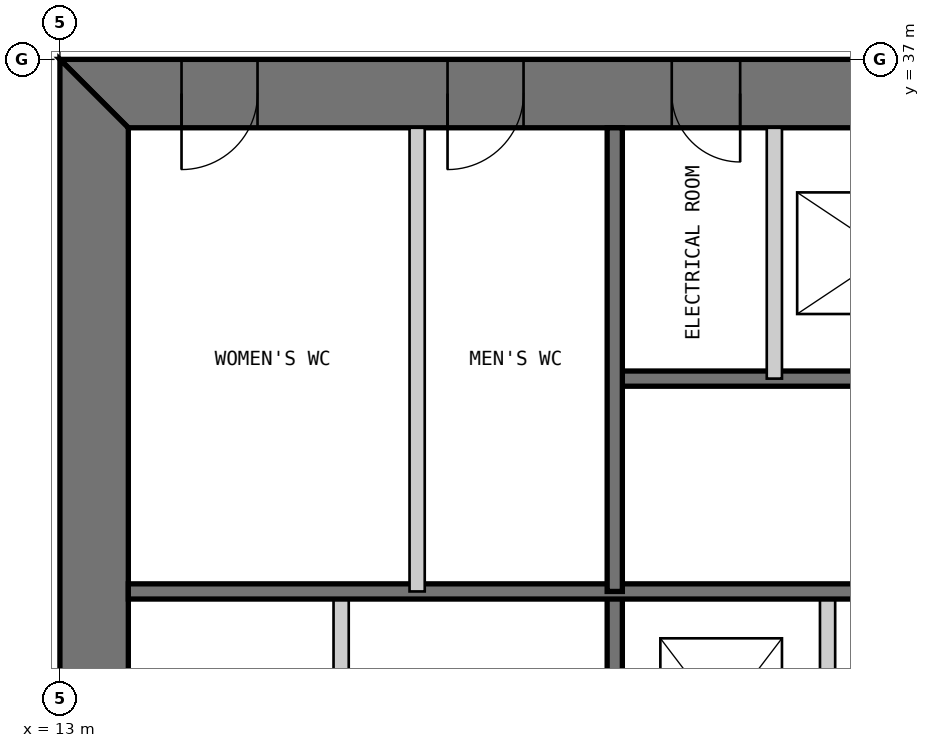
"""IFC4 building model, lengths in metres.
Left out: names, types, materials, properties, quantities, classifications, styles, units other than length and angle.
Written with IfcOpenShell. Run it as: python <this file> out.ifc"""

import sys

from ifc_helpers import new_model, si_unit, direction, frame, frame_2d, origin, place, context, subcontext, project, spatial, polyline, rectangle, outline, extrude, element, fill, save


model = new_model("IFC4")
c1 = context("Model", 3, precision=1e-05, world=origin(), true_north=direction((0.0, 1.0)))
c2 = subcontext(c1, "Body", "Model", "MODEL_VIEW")
j1 = project(units=[si_unit("LENGTHUNIT", "METRE"), si_unit("PLANEANGLEUNIT", "RADIAN")], contexts=[c1])
p1 = place(None, origin())
s1 = spatial("IfcSite", under=j1, at=p1, CompositionType="ELEMENT")
p2 = place(p1, origin())
s2 = spatial("IfcBuilding", under=s1, at=p2, CompositionType="ELEMENT")
p3 = place(p2, frame((0.0, 0.0, 110.4)))
s3 = spatial("IfcBuildingStorey", under=s2, at=p3, CompositionType="ELEMENT", Elevation=110.4)
p4 = place(p3, frame((37.0, 36.55, 0.0), z_axis=(0.0, 0.0, 1.0), x_axis=(-1.0, 0.0, 0.0)))
e1 = element("IfcWall", 1, at=p4, inside=s3, PredefinedType="SHEAR", context=c2, shape_type="SweptSolid", body=[
    extrude(outline(polyline([(0.0, -0.45), (24.0, -0.45), (23.1, 0.45), (0.9, 0.45), (0.0, -0.45)])), origin(), (0.0, 0.0, 1.0), 4.0),
])
p5 = place(p4, frame((4.9, 0.0, 0.0)))
e2 = element("IfcOpeningElement", 2, at=p5, cuts=e1, PredefinedType="OPENING", context=c2, shape_type="SweptSolid", body=[
    extrude(rectangle(XDim=1.0, YDim=2.2, at=frame_2d((0.5, 1.1))), frame((0.0, 0.46, 0.0), z_axis=(0.0, -1.0, 0.0), x_axis=(1.0, 0.0, 0.0)), (0.0, 0.0, 1.0), 0.92),
])
p6 = place(p4, frame((8.9, 0.0, 0.0)))
e3 = element("IfcOpeningElement", 3, at=p6, cuts=e1, PredefinedType="OPENING", context=c2, shape_type="SweptSolid", body=[
    extrude(rectangle(XDim=1.1, YDim=2.2, at=frame_2d((0.55, 1.1))), frame((0.0, 0.46, 0.0), z_axis=(0.0, -1.0, 0.0), x_axis=(1.0, 0.0, 0.0)), (0.0, 0.0, 1.0), 0.92),
])
p7 = place(p4, frame((15.05, 0.0, 0.0)))
e4 = element("IfcOpeningElement", 4, at=p7, cuts=e1, PredefinedType="OPENING", context=c2, shape_type="SweptSolid", body=[
    extrude(rectangle(XDim=0.9, YDim=2.2, at=frame_2d((0.45, 1.1))), frame((0.0, 0.46, 0.0), z_axis=(0.0, -1.0, 0.0), x_axis=(1.0, 0.0, 0.0)), (0.0, 0.0, 1.0), 0.92),
])
p8 = place(p4, frame((17.9, 0.0, 0.0)))
e5 = element("IfcOpeningElement", 5, at=p8, cuts=e1, PredefinedType="OPENING", context=c2, shape_type="SweptSolid", body=[
    extrude(rectangle(XDim=1.0, YDim=2.2, at=frame_2d((0.5, 1.1))), frame((0.0, 0.46, 0.0), z_axis=(0.0, -1.0, 0.0), x_axis=(1.0, 0.0, 0.0)), (0.0, 0.0, 1.0), 0.92),
])
p9 = place(p4, frame((21.4, 0.0, 0.0)))
e6 = element("IfcOpeningElement", 6, at=p9, cuts=e1, PredefinedType="OPENING", context=c2, shape_type="SweptSolid", body=[
    extrude(rectangle(XDim=1.0, YDim=2.2, at=frame_2d((0.5, 1.1))), frame((0.0, 0.46, 0.0), z_axis=(0.0, -1.0, 0.0), x_axis=(1.0, 0.0, 0.0)), (0.0, 0.0, 1.0), 0.92),
])
p10 = place(p3, frame((13.45, 36.1, 0.0), z_axis=(0.0, 0.0, 1.0), x_axis=(0.0, -1.0, 0.0)))
e7 = element("IfcWall", 7, at=p10, inside=s3, PredefinedType="SHEAR", context=c2, shape_type="SweptSolid", body=[
    extrude(outline(polyline([(-0.9, -0.45), (23.1, -0.45), (22.2, 0.45), (0.0, 0.45), (-0.9, -0.45)])), origin(), (0.0, 0.0, 1.0), 4.0),
])
p11 = place(p10, frame((20.2, 0.0, 0.0)))
e8 = element("IfcOpeningElement", 8, at=p11, cuts=e7, PredefinedType="OPENING", context=c2, shape_type="SweptSolid", body=[
    extrude(rectangle(XDim=1.0, YDim=2.2, at=frame_2d((0.5, 1.1))), frame((0.0, 0.46, 0.0), z_axis=(0.0, -1.0, 0.0), x_axis=(1.0, 0.0, 0.0)), (0.0, 0.0, 1.0), 0.92),
])
p12 = place(p10, frame((17.25, 0.0, 0.0)))
e9 = element("IfcOpeningElement", 9, at=p12, cuts=e7, PredefinedType="OPENING", context=c2, shape_type="SweptSolid", body=[
    extrude(rectangle(XDim=0.9, YDim=2.2, at=frame_2d((0.45, 1.1))), frame((0.0, 0.46, 0.0), z_axis=(0.0, -1.0, 0.0), x_axis=(1.0, 0.0, 0.0)), (0.0, 0.0, 1.0), 0.92),
])
p13 = place(p3, frame((16.7, 13.9, 0.0), z_axis=(0.0, 0.0, 1.0), x_axis=(0.0, 1.0, 0.0)))
e10 = element("IfcWall", 10, at=p13, inside=s3, PredefinedType="PARTITIONING", context=c2, shape_type="SweptSolid", body=[
    extrude(rectangle(XDim=16.1, YDim=0.2, at=frame_2d((8.05, 0.0))), origin(), (0.0, 0.0, 1.0), 3.8),
])
p14 = place(p13, frame((7.95, 0.0, 0.0)))
e11 = element("IfcOpeningElement", 11, at=p14, cuts=e10, PredefinedType="OPENING", context=c2, shape_type="SweptSolid", body=[
    extrude(rectangle(XDim=0.9, YDim=2.2, at=frame_2d((0.45, 1.1))), frame((0.0, 0.11, 0.0), z_axis=(0.0, -1.0, 0.0), x_axis=(1.0, 0.0, 0.0)), (0.0, 0.0, 1.0), 0.22),
])
p15 = place(p13, frame((13.3, 0.0, 0.0)))
e12 = element("IfcOpeningElement", 12, at=p15, cuts=e10, PredefinedType="OPENING", context=c2, shape_type="SweptSolid", body=[
    extrude(rectangle(XDim=0.9, YDim=2.2, at=frame_2d((0.45, 1.1))), frame((0.0, 0.11, 0.0), z_axis=(0.0, -1.0, 0.0), x_axis=(1.0, 0.0, 0.0)), (0.0, 0.0, 1.0), 0.22),
])
p16 = place(p3, frame((20.3, 13.9, 0.0), z_axis=(0.0, 0.0, 1.0), x_axis=(0.0, 1.0, 0.0)))
e13 = element("IfcWall", 13, at=p16, inside=s3, PredefinedType="SOLIDWALL", context=c2, shape_type="SweptSolid", body=[
    extrude(rectangle(XDim=16.1, YDim=0.2, at=frame_2d((8.05, 0.0))), origin(), (0.0, 0.0, 1.0), 3.8),
])
p17 = place(p16, frame((7.217, 0.0, 0.0)))
e14 = element("IfcOpeningElement", 14, at=p17, cuts=e13, PredefinedType="OPENING", context=c2, shape_type="SweptSolid", body=[
    extrude(rectangle(XDim=1.1, YDim=2.2, at=frame_2d((0.55, 1.1))), frame((0.0, 0.11, 0.0), z_axis=(0.0, -1.0, 0.0), x_axis=(1.0, 0.0, 0.0)), (0.0, 0.0, 1.0), 0.22),
])
p18 = place(p16, frame((10.55, 0.0, 0.0)))
e15 = element("IfcOpeningElement", 15, at=p18, cuts=e13, PredefinedType="OPENING", context=c2, shape_type="SweptSolid", body=[
    extrude(rectangle(XDim=1.1, YDim=2.2, at=frame_2d((0.55, 1.1))), frame((0.0, 0.11, 0.0), z_axis=(0.0, -1.0, 0.0), x_axis=(1.0, 0.0, 0.0)), (0.0, 0.0, 1.0), 0.22),
])
p19 = place(p16, frame((13.883, 0.0, 0.0)))
e16 = element("IfcOpeningElement", 16, at=p19, cuts=e13, PredefinedType="OPENING", context=c2, shape_type="SweptSolid", body=[
    extrude(rectangle(XDim=1.1, YDim=2.2, at=frame_2d((0.55, 1.1))), frame((0.0, 0.11, 0.0), z_axis=(0.0, -1.0, 0.0), x_axis=(1.0, 0.0, 0.0)), (0.0, 0.0, 1.0), 0.22),
])
p20 = place(p3, frame((23.1, 20.0, 0.0), z_axis=(0.0, 0.0, 1.0), x_axis=(0.0, 1.0, 0.0)))
e17 = element("IfcWall", 17, at=p20, inside=s3, PredefinedType="PARTITIONING", context=c2, shape_type="SweptSolid", body=[
    extrude(rectangle(XDim=10.0, YDim=0.2, at=frame_2d((5.0, 0.0))), origin(), (0.0, 0.0, 1.0), 3.8),
])
p21 = place(p3, frame((29.7, 32.8, 0.0), z_axis=(0.0, 0.0, 1.0), x_axis=(-1.0, 0.0, 0.0)))
e18 = element("IfcWall", 18, at=p21, inside=s3, PredefinedType="SOLIDWALL", context=c2, shape_type="SweptSolid", body=[
    extrude(rectangle(XDim=9.4, YDim=0.2, at=frame_2d((4.7, 0.0))), origin(), (0.0, 0.0, 1.0), 3.8),
])
p22 = place(p21, frame((0.25, 0.0, 0.0)))
e19 = element("IfcOpeningElement", 19, at=p22, cuts=e18, PredefinedType="OPENING", context=c2, shape_type="SweptSolid", body=[
    extrude(rectangle(XDim=1.0, YDim=2.2, at=frame_2d((0.5, 1.1))), frame((0.0, 0.11, 0.0), z_axis=(0.0, -1.0, 0.0), x_axis=(1.0, 0.0, 0.0)), (0.0, 0.0, 1.0), 0.22),
])
p23 = place(p3, frame((29.7, 30.0, 0.0), z_axis=(0.0, 0.0, 1.0), x_axis=(-1.0, 0.0, 0.0)))
e20 = element("IfcWall", 20, at=p23, inside=s3, PredefinedType="SOLIDWALL", context=c2, shape_type="SweptSolid", body=[
    extrude(rectangle(XDim=15.8, YDim=0.2, at=frame_2d((7.9, 0.0))), origin(), (0.0, 0.0, 1.0), 3.8),
])
p24 = place(p3, frame((22.4, 36.1, 0.0), z_axis=(0.0, 0.0, 1.0), x_axis=(0.0, -1.0, 0.0)))
e21 = element("IfcWall", 21, at=p24, inside=s3, PredefinedType="PARTITIONING", context=c2, shape_type="SweptSolid", body=[
    extrude(rectangle(XDim=3.3, YDim=0.2, at=frame_2d((1.65, 0.0))), origin(), (0.0, 0.0, 1.0), 3.8),
])
p25 = place(p3, frame((20.3, 36.1, 0.0), z_axis=(0.0, 0.0, 1.0), x_axis=(0.0, -1.0, 0.0)))
e22 = element("IfcWall", 22, at=p25, inside=s3, PredefinedType="SOLIDWALL", context=c2, shape_type="SweptSolid", body=[
    extrude(rectangle(XDim=6.1, YDim=0.2, at=frame_2d((3.05, 0.0))), origin(), (0.0, 0.0, 1.0), 3.8),
])
p26 = place(p3, frame((17.7, 36.1, 0.0), z_axis=(0.0, 0.0, 1.0), x_axis=(0.0, -1.0, 0.0)))
e23 = element("IfcWall", 23, at=p26, inside=s3, PredefinedType="PARTITIONING", context=c2, shape_type="SweptSolid", body=[
    extrude(rectangle(XDim=6.1, YDim=0.2, at=frame_2d((3.05, 0.0))), origin(), (0.0, 0.0, 1.0), 3.8),
])
p27 = place(p7, origin())
e24 = element("IfcDoor", 24, at=p27, inside=s3, OperationType="SINGLE_SWING_LEFT", PredefinedType="DOOR", context=c2, shape_type="SweptSolid", body=[
    extrude(rectangle(XDim=0.9, YDim=2.2, at=frame_2d((0.45, 1.1))), frame((0.0, 0.025, 0.0), z_axis=(0.0, -1.0, 0.0), x_axis=(1.0, 0.0, 0.0)), (0.0, 0.0, 1.0), 0.05),
    extrude(outline(polyline([(0.0, 0.0), (0.04, 0.0), (0.04, 2.16), (0.86, 2.16), (0.86, 0.0), (0.9, 0.0), (0.9, 2.2), (0.0, 2.2), (0.0, 0.0)])), frame((0.0, 0.3, 0.0), z_axis=(0.0, -1.0, 0.0), x_axis=(1.0, 0.0, 0.0)), (0.0, 0.0, 1.0), 0.6),
])
fill(e4, e24)
p28 = place(p8, origin())
e25 = element("IfcDoor", 25, at=p28, inside=s3, OperationType="SINGLE_SWING_RIGHT", PredefinedType="DOOR", context=c2, shape_type="SweptSolid", body=[
    extrude(rectangle(XDim=1.0, YDim=2.2, at=frame_2d((0.5, 1.1))), frame((0.0, 0.025, 0.0), z_axis=(0.0, -1.0, 0.0), x_axis=(1.0, 0.0, 0.0)), (0.0, 0.0, 1.0), 0.05),
    extrude(outline(polyline([(0.0, 0.0), (0.04, 0.0), (0.04, 2.16), (0.96, 2.16), (0.96, 0.0), (1.0, 0.0), (1.0, 2.2), (0.0, 2.2), (0.0, 0.0)])), frame((0.0, 0.3, 0.0), z_axis=(0.0, -1.0, 0.0), x_axis=(1.0, 0.0, 0.0)), (0.0, 0.0, 1.0), 0.6),
])
fill(e5, e25)
p29 = place(p9, origin())
e26 = element("IfcDoor", 26, at=p29, inside=s3, OperationType="SINGLE_SWING_RIGHT", PredefinedType="DOOR", context=c2, shape_type="SweptSolid", body=[
    extrude(rectangle(XDim=1.0, YDim=2.2, at=frame_2d((0.5, 1.1))), frame((0.0, 0.025, 0.0), z_axis=(0.0, -1.0, 0.0), x_axis=(1.0, 0.0, 0.0)), (0.0, 0.0, 1.0), 0.05),
    extrude(outline(polyline([(0.0, 0.0), (0.04, 0.0), (0.04, 2.16), (0.96, 2.16), (0.96, 0.0), (1.0, 0.0), (1.0, 2.2), (0.0, 2.2), (0.0, 0.0)])), frame((0.0, 0.3, 0.0), z_axis=(0.0, -1.0, 0.0), x_axis=(1.0, 0.0, 0.0)), (0.0, 0.0, 1.0), 0.6),
])
fill(e6, e26)
save(model, sys.argv[1])
